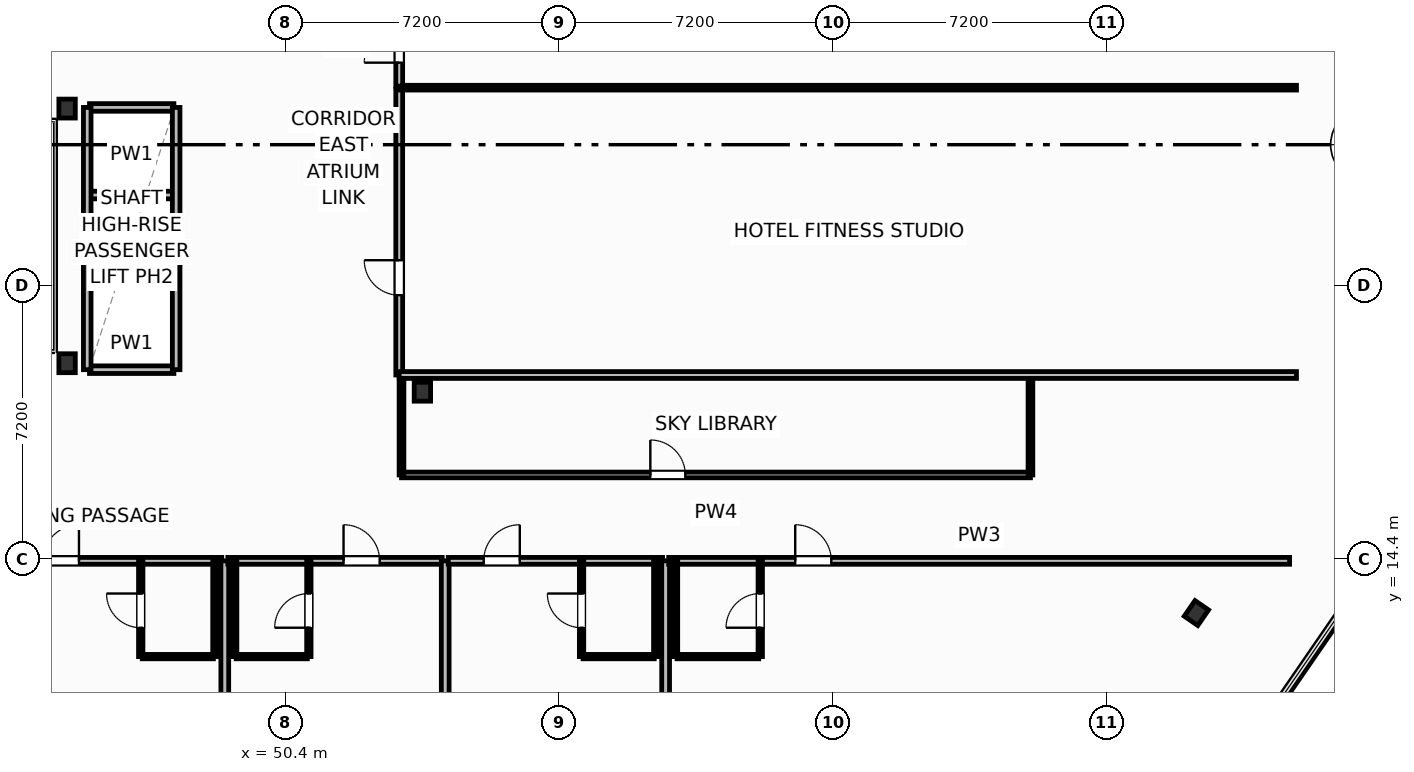
"""IFC4 building model, lengths in metres.
Left out: names, types, materials, properties, quantities, classifications, styles, units other than length and angle.
Written with IfcOpenShell. Run it as: python <this file> out.ifc"""

import sys

from ifc_helpers import new_model, si_unit, direction, frame, frame_2d, origin, origin_2d, place, context, subcontext, project, spatial, rectangle, i_section, extrude, element, fill, save


model = new_model("IFC4")
c1 = context("Model", 3, precision=1e-05, world=origin(), true_north=direction((0.0, 1.0)))
c2 = subcontext(c1, "Body", "Model", "MODEL_VIEW")
j1 = project(units=[si_unit("LENGTHUNIT", "METRE"), si_unit("PLANEANGLEUNIT", "RADIAN")], contexts=[c1])
p1 = place(None, origin())
s1 = spatial("IfcSite", under=j1, at=p1, CompositionType="ELEMENT")
p2 = place(p1, origin())
s2 = spatial("IfcBuilding", under=s1, at=p2, CompositionType="ELEMENT")
p3 = place(p2, frame((0.0, 0.0, 60.3)))
s3 = spatial("IfcBuildingStorey", under=s2, at=p3, CompositionType="ELEMENT", Elevation=60.3)
for number, where, z_axis, x_axis in (
    (1, (44.65, 19.55, 0.0), (0.0, 0.0, 1.0), (1.0, 0.0, 0.0)),
    (2, (44.65, 26.25, 0.0), (0.0, 0.0, 1.0), (1.0, 0.0, 0.0)),
    (3, (54.0, 18.8, 0.0), (0.0, 0.0, 1.0), (1.0, 0.0, 0.0)),
    (4, (74.367, 12.976, 0.0), (0.0, 0.0, 1.0), (0.824, -0.567, 0.0)),
):
    element("IfcColumn", number, at=place(p3, frame(where, z_axis=z_axis, x_axis=x_axis)), inside=s3, PredefinedType="COLUMN", context=c2, shape_type="SweptSolid", body=[
        extrude(i_section(OverallWidth=0.432, OverallDepth=0.498, WebThickness=0.056, FlangeThickness=0.089, FilletRadius=0.025, at=origin_2d()), origin(), (0.0, 0.0, 1.0), 3.7),
    ])
p4 = place(p3, frame((81.127, 26.995, 0.0), z_axis=(0.0, 0.0, 1.0), x_axis=(-0.823530169317, 0.567272474411, 0.0)))
e5 = element("IfcWall", 5, at=p4, inside=s3, PredefinedType="SOLIDWALL", context=c2, shape_type="SweptSolid", body=[
    extrude(rectangle(XDim=23.247, YDim=0.22, at=frame_2d((11.624, 0.0))), origin(), (0.0, 0.0, 1.0), 2.73),
])
p5 = place(p4, frame((10.799, 0.0, 0.8)))
e6 = element("IfcOpeningElement", 6, at=p5, cuts=e5, PredefinedType="OPENING", context=c2, shape_type="SweptSolid", body=[
    extrude(rectangle(XDim=1.65, YDim=1.65, at=frame_2d((0.825, 0.825))), frame((0.0, 0.12, 0.0), z_axis=(0.0, -1.0, 0.0), x_axis=(1.0, 0.0, 0.0)), (0.0, 0.0, 1.0), 0.24),
])
p6 = place(p3, frame((53.45, 16.61, 0.0), z_axis=(0.0, 0.0, 1.0), x_axis=(1.0, 0.0, 0.0)))
e7 = element("IfcWall", 7, at=p6, inside=s3, PredefinedType="PARTITIONING", context=c2, shape_type="SweptSolid", body=[
    extrude(rectangle(XDim=16.55, YDim=0.15, at=frame_2d((8.275, 0.0))), origin(), (0.0, 0.0, 1.0), 2.58),
])
p7 = place(p6, frame((6.548, 0.0, 0.0)))
e8 = element("IfcOpeningElement", 8, at=p7, cuts=e7, PredefinedType="OPENING", context=c2, shape_type="SweptSolid", body=[
    extrude(rectangle(XDim=0.92, YDim=2.05, at=frame_2d((0.46, 1.025))), frame((0.0, 0.085, 0.0), z_axis=(0.0, -1.0, 0.0), x_axis=(1.0, 0.0, 0.0)), (0.0, 0.0, 1.0), 0.17),
])
for number, where, z_axis, x_axis in (
    (9, (53.45, 16.61, 0.0), (0.0, 0.0, 1.0), (0.0, 1.0, 0.0)),
    (10, (70.0, 16.61, 0.0), (0.0, 0.0, 1.0), (0.0, 1.0, 0.0)),
):
    element("IfcWall", number, at=place(p3, frame(where, z_axis=z_axis, x_axis=x_axis)), inside=s3, PredefinedType="PARTITIONING", context=c2, shape_type="SweptSolid", body=[
        extrude(rectangle(XDim=2.63, YDim=0.125, at=frame_2d((1.315, 0.0))), origin(), (0.0, 0.0, 1.0), 3.45),
    ])
p8 = place(p3, frame((43.08, 14.35, 0.0), z_axis=(0.0, 0.0, 1.0), x_axis=(1.0, 0.0, 0.0)))
e11 = element("IfcWall", 11, at=p8, inside=s3, PredefinedType="PARTITIONING", context=c2, shape_type="SweptSolid", body=[
    extrude(rectangle(XDim=5.64, YDim=0.18, at=frame_2d((2.82, 0.0))), origin(), (0.0, 0.0, 1.0), 3.45),
])
p9 = place(p8, frame((0.933, 0.0, 0.0)))
e12 = element("IfcOpeningElement", 12, at=p9, cuts=e11, PredefinedType="OPENING", context=c2, shape_type="SweptSolid", body=[
    extrude(rectangle(XDim=0.95, YDim=2.15, at=frame_2d((0.475, 1.075))), frame((0.0, 0.1, 0.0), z_axis=(0.0, -1.0, 0.0), x_axis=(1.0, 0.0, 0.0)), (0.0, 0.0, 1.0), 0.2),
])
p10 = place(p3, frame((46.628, 11.83, 0.0), z_axis=(0.0, 0.0, 1.0), x_axis=(1.0, 0.0, 0.0)))
e13 = element("IfcWall", 13, at=p10, inside=s3, PredefinedType="PARTITIONING", context=c2, shape_type="SweptSolid", body=[
    extrude(rectangle(XDim=1.872, YDim=0.115, at=frame_2d((0.936, 0.0))), origin(), (0.0, 0.0, 1.0), 3.45),
])
p11 = place(p3, frame((46.588, 11.83, 0.0), z_axis=(0.0, 0.0, 1.0), x_axis=(0.0, 1.0, 0.0)))
e14 = element("IfcWall", 14, at=p11, inside=s3, PredefinedType="PARTITIONING", context=c2, shape_type="SweptSolid", body=[
    extrude(rectangle(XDim=2.52, YDim=0.115, at=frame_2d((1.26, 0.0))), origin(), (0.0, 0.0, 1.0), 3.45),
])
p12 = place(p11, frame((0.76, 0.0, 0.0)))
e15 = element("IfcOpeningElement", 15, at=p12, cuts=e14, PredefinedType="OPENING", context=c2, shape_type="SweptSolid", body=[
    extrude(rectangle(XDim=0.9, YDim=2.05, at=frame_2d((0.45, 1.025))), frame((0.0, 0.067, 0.0), z_axis=(0.0, -1.0, 0.0), x_axis=(1.0, 0.0, 0.0)), (0.0, 0.0, 1.0), 0.135),
])
p13 = place(p3, frame((48.54, 11.83, 0.0), z_axis=(0.0, 0.0, 1.0), x_axis=(0.0, 1.0, 0.0)))
e16 = element("IfcWall", 16, at=p13, inside=s3, PredefinedType="PARTITIONING", context=c2, shape_type="SweptSolid", body=[
    extrude(rectangle(XDim=2.52, YDim=0.115, at=frame_2d((1.26, 0.0))), origin(), (0.0, 0.0, 1.0), 3.45),
])
p14 = place(p3, frame((48.8, -4.0, 0.0), z_axis=(0.0, 0.0, 1.0), x_axis=(0.0, 1.0, 0.0)))
e17 = element("IfcWall", 17, at=p14, inside=s3, PredefinedType="PARTITIONING", context=c2, shape_type="SweptSolid", body=[
    extrude(rectangle(XDim=18.35, YDim=0.205, at=frame_2d((9.175, 0.0))), origin(), (0.0, 0.0, 1.0), 3.45),
])
p15 = place(p3, frame((48.88, 14.35, 0.0), z_axis=(0.0, 0.0, 1.0), x_axis=(1.0, 0.0, 0.0)))
e18 = element("IfcWall", 18, at=p15, inside=s3, PredefinedType="PARTITIONING", context=c2, shape_type="SweptSolid", body=[
    extrude(rectangle(XDim=5.64, YDim=0.18, at=frame_2d((2.82, 0.0))), origin(), (0.0, 0.0, 1.0), 3.45),
])
p16 = place(p15, frame((3.045, 0.0, 0.0)))
e19 = element("IfcOpeningElement", 19, at=p16, cuts=e18, PredefinedType="OPENING", context=c2, shape_type="SweptSolid", body=[
    extrude(rectangle(XDim=0.95, YDim=2.15, at=frame_2d((0.475, 1.075))), frame((0.0, 0.1, 0.0), z_axis=(0.0, -1.0, 0.0), x_axis=(1.0, 0.0, 0.0)), (0.0, 0.0, 1.0), 0.2),
])
p17 = place(p3, frame((49.1, 11.83, 0.0), z_axis=(0.0, 0.0, 1.0), x_axis=(1.0, 0.0, 0.0)))
e20 = element("IfcWall", 20, at=p17, inside=s3, PredefinedType="PARTITIONING", context=c2, shape_type="SweptSolid", body=[
    extrude(rectangle(XDim=1.872, YDim=0.115, at=frame_2d((0.936, 0.0))), origin(), (0.0, 0.0, 1.0), 3.45),
])
p18 = place(p3, frame((51.012, 11.83, 0.0), z_axis=(0.0, 0.0, 1.0), x_axis=(0.0, 1.0, 0.0)))
e21 = element("IfcWall", 21, at=p18, inside=s3, PredefinedType="PARTITIONING", context=c2, shape_type="SweptSolid", body=[
    extrude(rectangle(XDim=2.52, YDim=0.115, at=frame_2d((1.26, 0.0))), origin(), (0.0, 0.0, 1.0), 3.45),
])
p19 = place(p18, frame((0.76, 0.0, 0.0)))
e22 = element("IfcOpeningElement", 22, at=p19, cuts=e21, PredefinedType="OPENING", context=c2, shape_type="SweptSolid", body=[
    extrude(rectangle(XDim=0.9, YDim=2.05, at=frame_2d((0.45, 1.025))), frame((0.0, 0.067, 0.0), z_axis=(0.0, -1.0, 0.0), x_axis=(1.0, 0.0, 0.0)), (0.0, 0.0, 1.0), 0.135),
])
p20 = place(p3, frame((49.06, 11.83, 0.0), z_axis=(0.0, 0.0, 1.0), x_axis=(0.0, 1.0, 0.0)))
e23 = element("IfcWall", 23, at=p20, inside=s3, PredefinedType="PARTITIONING", context=c2, shape_type="SweptSolid", body=[
    extrude(rectangle(XDim=2.52, YDim=0.115, at=frame_2d((1.26, 0.0))), origin(), (0.0, 0.0, 1.0), 3.45),
])
p21 = place(p3, frame((54.6, -4.0, 0.0), z_axis=(0.0, 0.0, 1.0), x_axis=(0.0, 1.0, 0.0)))
e24 = element("IfcWall", 24, at=p21, inside=s3, PredefinedType="PARTITIONING", context=c2, shape_type="SweptSolid", body=[
    extrude(rectangle(XDim=18.35, YDim=0.205, at=frame_2d((9.175, 0.0))), origin(), (0.0, 0.0, 1.0), 3.45),
])
p22 = place(p3, frame((54.68, 14.35, 0.0), z_axis=(0.0, 0.0, 1.0), x_axis=(1.0, 0.0, 0.0)))
e25 = element("IfcWall", 25, at=p22, inside=s3, PredefinedType="PARTITIONING", context=c2, shape_type="SweptSolid", body=[
    extrude(rectangle(XDim=5.64, YDim=0.18, at=frame_2d((2.82, 0.0))), origin(), (0.0, 0.0, 1.0), 3.45),
])
p23 = place(p22, frame((0.933, 0.0, 0.0)))
e26 = element("IfcOpeningElement", 26, at=p23, cuts=e25, PredefinedType="OPENING", context=c2, shape_type="SweptSolid", body=[
    extrude(rectangle(XDim=0.95, YDim=2.15, at=frame_2d((0.475, 1.075))), frame((0.0, 0.1, 0.0), z_axis=(0.0, -1.0, 0.0), x_axis=(1.0, 0.0, 0.0)), (0.0, 0.0, 1.0), 0.2),
])
p24 = place(p3, frame((58.228, 11.83, 0.0), z_axis=(0.0, 0.0, 1.0), x_axis=(1.0, 0.0, 0.0)))
e27 = element("IfcWall", 27, at=p24, inside=s3, PredefinedType="PARTITIONING", context=c2, shape_type="SweptSolid", body=[
    extrude(rectangle(XDim=1.872, YDim=0.115, at=frame_2d((0.936, 0.0))), origin(), (0.0, 0.0, 1.0), 3.45),
])
p25 = place(p3, frame((58.188, 11.83, 0.0), z_axis=(0.0, 0.0, 1.0), x_axis=(0.0, 1.0, 0.0)))
e28 = element("IfcWall", 28, at=p25, inside=s3, PredefinedType="PARTITIONING", context=c2, shape_type="SweptSolid", body=[
    extrude(rectangle(XDim=2.52, YDim=0.115, at=frame_2d((1.26, 0.0))), origin(), (0.0, 0.0, 1.0), 3.45),
])
p26 = place(p25, frame((0.76, 0.0, 0.0)))
e29 = element("IfcOpeningElement", 29, at=p26, cuts=e28, PredefinedType="OPENING", context=c2, shape_type="SweptSolid", body=[
    extrude(rectangle(XDim=0.9, YDim=2.05, at=frame_2d((0.45, 1.025))), frame((0.0, 0.067, 0.0), z_axis=(0.0, -1.0, 0.0), x_axis=(1.0, 0.0, 0.0)), (0.0, 0.0, 1.0), 0.135),
])
p27 = place(p3, frame((60.14, 11.83, 0.0), z_axis=(0.0, 0.0, 1.0), x_axis=(0.0, 1.0, 0.0)))
e30 = element("IfcWall", 30, at=p27, inside=s3, PredefinedType="PARTITIONING", context=c2, shape_type="SweptSolid", body=[
    extrude(rectangle(XDim=2.52, YDim=0.115, at=frame_2d((1.26, 0.0))), origin(), (0.0, 0.0, 1.0), 3.45),
])
p28 = place(p3, frame((60.4, -4.0, 0.0), z_axis=(0.0, 0.0, 1.0), x_axis=(0.0, 1.0, 0.0)))
e31 = element("IfcWall", 31, at=p28, inside=s3, PredefinedType="PARTITIONING", context=c2, shape_type="SweptSolid", body=[
    extrude(rectangle(XDim=18.35, YDim=0.205, at=frame_2d((9.175, 0.0))), origin(), (0.0, 0.0, 1.0), 3.45),
])
p29 = place(p3, frame((60.48, 14.35, 0.0), z_axis=(0.0, 0.0, 1.0), x_axis=(1.0, 0.0, 0.0)))
e32 = element("IfcWall", 32, at=p29, inside=s3, PredefinedType="PARTITIONING", context=c2, shape_type="SweptSolid", body=[
    extrude(rectangle(XDim=16.34, YDim=0.18, at=frame_2d((8.17, 0.0))), origin(), (0.0, 0.0, 1.0), 2.58),
])
p30 = place(p29, frame((3.33, 0.0, 0.0)))
e33 = element("IfcOpeningElement", 33, at=p30, cuts=e32, PredefinedType="OPENING", context=c2, shape_type="SweptSolid", body=[
    extrude(rectangle(XDim=0.95, YDim=2.15, at=frame_2d((0.475, 1.075))), frame((0.0, 0.1, 0.0), z_axis=(0.0, -1.0, 0.0), x_axis=(1.0, 0.0, 0.0)), (0.0, 0.0, 1.0), 0.2),
])
p31 = place(p3, frame((60.7, 11.83, 0.0), z_axis=(0.0, 0.0, 1.0), x_axis=(1.0, 0.0, 0.0)))
e34 = element("IfcWall", 34, at=p31, inside=s3, PredefinedType="PARTITIONING", context=c2, shape_type="SweptSolid", body=[
    extrude(rectangle(XDim=2.15, YDim=0.115, at=frame_2d((1.075, 0.0))), origin(), (0.0, 0.0, 1.0), 3.45),
])
p32 = place(p3, frame((62.89, 11.83, 0.0), z_axis=(0.0, 0.0, 1.0), x_axis=(0.0, 1.0, 0.0)))
e35 = element("IfcWall", 35, at=p32, inside=s3, PredefinedType="PARTITIONING", context=c2, shape_type="SweptSolid", body=[
    extrude(rectangle(XDim=2.52, YDim=0.115, at=frame_2d((1.26, 0.0))), origin(), (0.0, 0.0, 1.0), 3.45),
])
p33 = place(p32, frame((0.76, 0.0, 0.0)))
e36 = element("IfcOpeningElement", 36, at=p33, cuts=e35, PredefinedType="OPENING", context=c2, shape_type="SweptSolid", body=[
    extrude(rectangle(XDim=0.9, YDim=2.05, at=frame_2d((0.45, 1.025))), frame((0.0, 0.067, 0.0), z_axis=(0.0, -1.0, 0.0), x_axis=(1.0, 0.0, 0.0)), (0.0, 0.0, 1.0), 0.135),
])
p34 = place(p3, frame((60.66, 11.83, 0.0), z_axis=(0.0, 0.0, 1.0), x_axis=(0.0, 1.0, 0.0)))
e37 = element("IfcWall", 37, at=p34, inside=s3, PredefinedType="PARTITIONING", context=c2, shape_type="SweptSolid", body=[
    extrude(rectangle(XDim=2.52, YDim=0.115, at=frame_2d((1.26, 0.0))), origin(), (0.0, 0.0, 1.0), 3.45),
])
p35 = place(p3, frame((53.39, 19.24, 0.0), z_axis=(0.0, 0.0, 1.0), x_axis=(0.0, 1.0, 0.0)))
e38 = element("IfcWall", 38, at=p35, inside=s3, PredefinedType="PARTITIONING", context=c2, shape_type="SweptSolid", body=[
    extrude(rectangle(XDim=7.52, YDim=0.18, at=frame_2d((3.76, 0.0))), origin(), (0.0, 0.0, 1.0), 3.45),
])
p36 = place(p35, frame((2.1, 0.0, 0.0)))
e39 = element("IfcOpeningElement", 39, at=p36, cuts=e38, PredefinedType="OPENING", context=c2, shape_type="SweptSolid", body=[
    extrude(rectangle(XDim=0.92, YDim=2.05, at=frame_2d((0.46, 1.025))), frame((0.0, 0.1, 0.0), z_axis=(0.0, -1.0, 0.0), x_axis=(1.0, 0.0, 0.0)), (0.0, 0.0, 1.0), 0.2),
])
p37 = place(p3, frame((53.39, 26.8, 0.0), z_axis=(0.0, 0.0, 1.0), x_axis=(1.0, 0.0, 0.0)))
e40 = element("IfcWall", 40, at=p37, inside=s3, PredefinedType="PARTITIONING", context=c2, shape_type="SweptSolid", body=[
    extrude(rectangle(XDim=23.61, YDim=0.125, at=frame_2d((11.805, 0.0))), origin(), (0.0, 0.0, 1.0), 3.45),
])
p38 = place(p3, frame((53.39, 19.24, 0.0), z_axis=(0.0, 0.0, 1.0), x_axis=(1.0, 0.0, 0.0)))
e41 = element("IfcWall", 41, at=p38, inside=s3, PredefinedType="PARTITIONING", context=c2, shape_type="SweptSolid", body=[
    extrude(rectangle(XDim=23.61, YDim=0.18, at=frame_2d((11.805, 0.0))), origin(), (0.0, 0.0, 1.0), 3.45),
])
p39 = place(p3, frame((53.39, 26.84, 0.0), z_axis=(0.0, 0.0, 1.0), x_axis=(0.0, 1.0, 0.0)))
e42 = element("IfcWall", 42, at=p39, inside=s3, PredefinedType="PARTITIONING", context=c2, shape_type="SweptSolid", body=[
    extrude(rectangle(XDim=12.46, YDim=0.18, at=frame_2d((6.23, 0.0))), origin(), (0.0, 0.0, 1.0), 3.45),
])
p40 = place(p39, frame((0.618, 0.0, 0.0)))
e43 = element("IfcOpeningElement", 43, at=p40, cuts=e42, PredefinedType="OPENING", context=c2, shape_type="SweptSolid", body=[
    extrude(rectangle(XDim=0.92, YDim=2.05, at=frame_2d((0.46, 1.025))), frame((0.0, 0.1, 0.0), z_axis=(0.0, -1.0, 0.0), x_axis=(1.0, 0.0, 0.0)), (0.0, 0.0, 1.0), 0.2),
])
for number, where, z_axis, x_axis in (
    (44, (45.24, 21.675, 0.0), (0.0, 0.0, 1.0), (1.0, 0.0, 0.0)),
    (45, (45.24, 23.975, 0.0), (0.0, 0.0, 1.0), (1.0, 0.0, 0.0)),
):
    element("IfcWall", number, at=place(p3, frame(where, z_axis=z_axis, x_axis=x_axis)), inside=s3, PredefinedType="PARTITIONING", context=c2, shape_type="SweptSolid", body=[
        extrude(rectangle(XDim=2.22, YDim=0.2, at=frame_2d((1.11, 0.0))), origin(), (0.0, 0.0, 1.0), 3.45),
    ])
p41 = place(p3, frame((45.24, 19.38, 0.0), z_axis=(0.0, 0.0, 1.0), x_axis=(1.0, 0.0, 0.0)))
e46 = element("IfcWall", 46, at=p41, inside=s3, PredefinedType="PARTITIONING", context=c2, shape_type="SweptSolid", body=[
    extrude(rectangle(XDim=2.22, YDim=0.2, at=frame_2d((1.11, 0.0))), origin(), (0.0, 0.0, 1.0), 2.662),
])
p42 = place(p3, frame((45.24, 26.28, 0.0), z_axis=(0.0, 0.0, 1.0), x_axis=(1.0, 0.0, 0.0)))
e47 = element("IfcWall", 47, at=p42, inside=s3, PredefinedType="PARTITIONING", context=c2, shape_type="SweptSolid", body=[
    extrude(rectangle(XDim=2.22, YDim=0.2, at=frame_2d((1.11, 0.0))), origin(), (0.0, 0.0, 1.0), 3.45),
])
for number, where, z_axis, x_axis in (
    (48, (45.18, 19.38, 0.0), (0.0, 0.0, 1.0), (0.0, 1.0, 0.0)),
    (49, (47.52, 19.38, 0.0), (0.0, 0.0, 1.0), (0.0, 1.0, 0.0)),
):
    element("IfcWall", number, at=place(p3, frame(where, z_axis=z_axis, x_axis=x_axis)), inside=s3, PredefinedType="PARTITIONING", context=c2, shape_type="SweptSolid", body=[
        extrude(rectangle(XDim=6.9, YDim=0.2, at=frame_2d((3.45, 0.0))), origin(), (0.0, 0.0, 1.0), 3.45),
    ])
p43 = place(p7, origin())
e50 = element("IfcDoor", 50, at=p43, inside=s3, OperationType="SINGLE_SWING_LEFT", PredefinedType="DOOR", context=c2, shape_type="SweptSolid", body=[
    extrude(rectangle(XDim=0.92, YDim=2.05, at=frame_2d((0.46, 1.025))), frame((0.0, 0.025, 0.0), z_axis=(0.0, -1.0, 0.0), x_axis=(1.0, 0.0, 0.0)), (0.0, 0.0, 1.0), 0.05),
])
fill(e8, e50)
p44 = place(p9, origin())
e51 = element("IfcDoor", 51, at=p44, inside=s3, OperationType="SINGLE_SWING_RIGHT", PredefinedType="DOOR", context=c2, shape_type="SweptSolid", body=[
    extrude(rectangle(XDim=0.95, YDim=2.15, at=frame_2d((0.475, 1.075))), frame((0.0, 0.025, 0.0), z_axis=(0.0, -1.0, 0.0), x_axis=(1.0, 0.0, 0.0)), (0.0, 0.0, 1.0), 0.05),
])
fill(e12, e51)
p45 = place(p12, origin())
e52 = element("IfcDoor", 52, at=p45, inside=s3, OperationType="SINGLE_SWING_RIGHT", PredefinedType="DOOR", context=c2, shape_type="SweptSolid", body=[
    extrude(rectangle(XDim=0.9, YDim=2.05, at=frame_2d((0.45, 1.025))), frame((0.0, 0.025, 0.0), z_axis=(0.0, -1.0, 0.0), x_axis=(1.0, 0.0, 0.0)), (0.0, 0.0, 1.0), 0.05),
])
fill(e15, e52)
p46 = place(p16, origin())
e53 = element("IfcDoor", 53, at=p46, inside=s3, OperationType="SINGLE_SWING_LEFT", PredefinedType="DOOR", context=c2, shape_type="SweptSolid", body=[
    extrude(rectangle(XDim=0.95, YDim=2.15, at=frame_2d((0.475, 1.075))), frame((0.0, 0.025, 0.0), z_axis=(0.0, -1.0, 0.0), x_axis=(1.0, 0.0, 0.0)), (0.0, 0.0, 1.0), 0.05),
])
fill(e19, e53)
p47 = place(p19, origin())
e54 = element("IfcDoor", 54, at=p47, inside=s3, OperationType="SINGLE_SWING_LEFT", PredefinedType="DOOR", context=c2, shape_type="SweptSolid", body=[
    extrude(rectangle(XDim=0.9, YDim=2.05, at=frame_2d((0.45, 1.025))), frame((0.0, 0.025, 0.0), z_axis=(0.0, -1.0, 0.0), x_axis=(1.0, 0.0, 0.0)), (0.0, 0.0, 1.0), 0.05),
])
fill(e22, e54)
p48 = place(p23, origin())
e55 = element("IfcDoor", 55, at=p48, inside=s3, OperationType="SINGLE_SWING_RIGHT", PredefinedType="DOOR", context=c2, shape_type="SweptSolid", body=[
    extrude(rectangle(XDim=0.95, YDim=2.15, at=frame_2d((0.475, 1.075))), frame((0.0, 0.025, 0.0), z_axis=(0.0, -1.0, 0.0), x_axis=(1.0, 0.0, 0.0)), (0.0, 0.0, 1.0), 0.05),
])
fill(e26, e55)
p49 = place(p26, origin())
e56 = element("IfcDoor", 56, at=p49, inside=s3, OperationType="SINGLE_SWING_RIGHT", PredefinedType="DOOR", context=c2, shape_type="SweptSolid", body=[
    extrude(rectangle(XDim=0.9, YDim=2.05, at=frame_2d((0.45, 1.025))), frame((0.0, 0.025, 0.0), z_axis=(0.0, -1.0, 0.0), x_axis=(1.0, 0.0, 0.0)), (0.0, 0.0, 1.0), 0.05),
])
fill(e29, e56)
p50 = place(p30, origin())
e57 = element("IfcDoor", 57, at=p50, inside=s3, OperationType="SINGLE_SWING_LEFT", PredefinedType="DOOR", context=c2, shape_type="SweptSolid", body=[
    extrude(rectangle(XDim=0.95, YDim=2.15, at=frame_2d((0.475, 1.075))), frame((0.0, 0.025, 0.0), z_axis=(0.0, -1.0, 0.0), x_axis=(1.0, 0.0, 0.0)), (0.0, 0.0, 1.0), 0.05),
])
fill(e33, e57)
p51 = place(p33, origin())
e58 = element("IfcDoor", 58, at=p51, inside=s3, OperationType="SINGLE_SWING_LEFT", PredefinedType="DOOR", context=c2, shape_type="SweptSolid", body=[
    extrude(rectangle(XDim=0.9, YDim=2.05, at=frame_2d((0.45, 1.025))), frame((0.0, 0.025, 0.0), z_axis=(0.0, -1.0, 0.0), x_axis=(1.0, 0.0, 0.0)), (0.0, 0.0, 1.0), 0.05),
])
fill(e36, e58)
p52 = place(p36, origin())
e59 = element("IfcDoor", 59, at=p52, inside=s3, OperationType="SINGLE_SWING_RIGHT", PredefinedType="DOOR", context=c2, shape_type="SweptSolid", body=[
    extrude(rectangle(XDim=0.92, YDim=2.05, at=frame_2d((0.46, 1.025))), frame((0.0, 0.025, 0.0), z_axis=(0.0, -1.0, 0.0), x_axis=(1.0, 0.0, 0.0)), (0.0, 0.0, 1.0), 0.05),
])
fill(e39, e59)
p53 = place(p40, origin())
e60 = element("IfcDoor", 60, at=p53, inside=s3, OperationType="SINGLE_SWING_LEFT", PredefinedType="DOOR", context=c2, shape_type="SweptSolid", body=[
    extrude(rectangle(XDim=0.92, YDim=2.05, at=frame_2d((0.46, 1.025))), frame((0.0, 0.025, 0.0), z_axis=(0.0, -1.0, 0.0), x_axis=(1.0, 0.0, 0.0)), (0.0, 0.0, 1.0), 0.05),
])
fill(e43, e60)
save(model, sys.argv[1])
